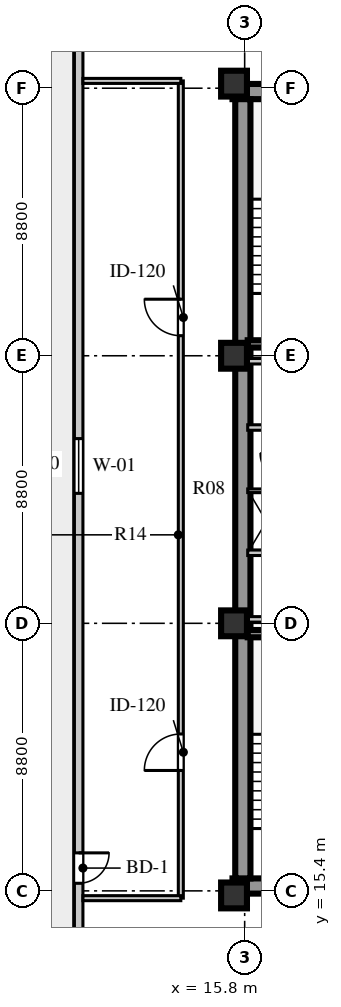
"""IFC4 building model, lengths in metres.
Left out: names, types, materials, properties, quantities, classifications, styles, units other than length and angle.
Written with IfcOpenShell. Run it as: python <this file> out.ifc"""

import sys

from ifc_helpers import new_model, si_unit, direction, frame, frame_2d, origin, origin_2d, place, context, subcontext, project, spatial, rectangle, extrude, element, fill, save


model = new_model("IFC4")
c1 = context("Model", 3, precision=1e-05, world=origin(), true_north=direction((0.0, 1.0)))
c2 = subcontext(c1, "Body", "Model", "MODEL_VIEW")
j1 = project(units=[si_unit("LENGTHUNIT", "METRE"), si_unit("PLANEANGLEUNIT", "RADIAN")], contexts=[c1])
p1 = place(None, origin())
s1 = spatial("IfcSite", under=j1, at=p1, CompositionType="ELEMENT")
p2 = place(p1, origin())
s2 = spatial("IfcBuilding", under=s1, at=p2, CompositionType="ELEMENT")
p3 = place(p2, frame((0.0, 0.0, 142.5)))
s3 = spatial("IfcBuildingStorey", under=s2, at=p3, CompositionType="ELEMENT", Elevation=142.5)
for number, where, z_axis, x_axis in (
    (1, (15.4, 15.56, 0.0), (0.0, 0.0, 1.0), (1.0, 0.0, 0.0)),
    (2, (15.4, 41.69, 0.0), (0.0, 0.0, 1.0), (1.0, 0.0, 0.0)),
):
    element("IfcWall", number, at=place(p3, frame(where, z_axis=z_axis, x_axis=x_axis)), inside=s3, PredefinedType="SHEAR", context=c2, shape_type="SweptSolid", body=[
        extrude(rectangle(XDim=9.68, YDim=0.5, at=frame_2d((4.84, 0.0))), origin(), (0.0, 0.0, 1.0), 3.6),
    ])
p4 = place(p3, frame((15.74, 15.81, 0.0), z_axis=(0.0, 0.0, 1.0), x_axis=(0.0, 1.0, 0.0)))
e3 = element("IfcWall", 3, at=p4, inside=s3, PredefinedType="SHEAR", context=c2, shape_type="SweptSolid", body=[
    extrude(rectangle(XDim=25.63, YDim=0.5, at=frame_2d((12.815, 0.0))), origin(), (0.0, 0.0, 1.0), 3.6),
])
for number, where, z_axis, x_axis in (
    (4, (15.45, 15.25, 0.0), (0.0, 0.0, 1.0), (1.0, 0.0, 0.0)),
    (5, (15.45, 24.2, 0.0), (0.0, 0.0, 1.0), (1.0, 0.0, 0.0)),
    (6, (15.45, 33.0, 0.0), (0.0, 0.0, 1.0), (1.0, 0.0, 0.0)),
    (7, (15.45, 41.95, 0.0), (0.0, 0.0, 1.0), (1.0, 0.0, 0.0)),
):
    element("IfcColumn", number, at=place(p3, frame(where, z_axis=z_axis, x_axis=x_axis)), inside=s3, PredefinedType="COLUMN", context=c2, shape_type="SweptSolid", body=[
        extrude(rectangle(XDim=0.85, YDim=0.85, at=origin_2d()), origin(), (0.0, 0.0, 1.0), 3.6),
    ])
p5 = place(p3, frame((10.34, 43.87, 0.0), z_axis=(0.0, 0.0, 1.0), x_axis=(0.0, -1.0, 0.0)))
e8 = element("IfcWall", 8, at=p5, inside=s3, PredefinedType="STANDARD", context=c2, shape_type="SweptSolid", body=[
    extrude(rectangle(XDim=30.54, YDim=0.28, at=frame_2d((15.27, 0.0))), origin(), (0.0, 0.0, 1.0), 3.6),
])
p6 = place(p5, frame((27.22, 0.0, 0.0)))
e9 = element("IfcOpeningElement", 9, at=p6, cuts=e8, PredefinedType="OPENING", context=c2, shape_type="SweptSolid", body=[
    extrude(rectangle(XDim=1.0, YDim=2.05, at=frame_2d((0.5, 1.025))), frame((0.0, 0.15, 0.0), z_axis=(0.0, -1.0, 0.0), x_axis=(1.0, 0.0, 0.0)), (0.0, 0.0, 1.0), 0.3),
])
p7 = place(p5, frame((13.595, 0.0, 0.8)))
e10 = element("IfcOpeningElement", 10, at=p7, cuts=e8, PredefinedType="OPENING", context=c2, shape_type="SweptSolid", body=[
    extrude(rectangle(XDim=1.8, YDim=2.0, at=frame_2d((0.9, 1.0))), frame((0.0, 0.15, 0.0), z_axis=(0.0, -1.0, 0.0), x_axis=(1.0, 0.0, 0.0)), (0.0, 0.0, 1.0), 0.3),
])
p8 = place(p3, frame((15.9, 23.86, 0.0), z_axis=(0.0, 0.0, 1.0), x_axis=(1.0, 0.0, 0.0)))
e11 = element("IfcWall", 11, at=p8, inside=s3, PredefinedType="SHEAR", context=c2, shape_type="SweptSolid", body=[
    extrude(rectangle(XDim=3.52, YDim=0.24, at=frame_2d((1.76, 0.0))), origin(), (0.0, 0.0, 1.0), 3.85),
])
p9 = place(p3, frame((15.9, 26.52, 0.0), z_axis=(0.0, 0.0, 1.0), x_axis=(1.0, 0.0, 0.0)))
e12 = element("IfcWall", 12, at=p9, inside=s3, PredefinedType="SOLIDWALL", context=c2, shape_type="SweptSolid", body=[
    extrude(rectangle(XDim=8.68, YDim=0.18, at=frame_2d((4.34, 0.0))), origin(), (0.0, 0.0, 1.0), 3.6),
])
p10 = place(p9, frame((2.5, 0.0, 0.0)))
e13 = element("IfcOpeningElement", 13, at=p10, cuts=e12, PredefinedType="OPENING", context=c2, shape_type="SweptSolid", body=[
    extrude(rectangle(XDim=0.95, YDim=2.1, at=frame_2d((0.475, 1.05))), frame((0.0, 0.1, 0.0), z_axis=(0.0, -1.0, 0.0), x_axis=(1.0, 0.0, 0.0)), (0.0, 0.0, 1.0), 0.2),
])
p11 = place(p9, frame((6.0, 0.0, 0.0)))
e14 = element("IfcOpeningElement", 14, at=p11, cuts=e12, PredefinedType="OPENING", context=c2, shape_type="SweptSolid", body=[
    extrude(rectangle(XDim=0.95, YDim=2.1, at=frame_2d((0.475, 1.05))), frame((0.0, 0.1, 0.0), z_axis=(0.0, -1.0, 0.0), x_axis=(1.0, 0.0, 0.0)), (0.0, 0.0, 1.0), 0.2),
])
p12 = place(p3, frame((15.9, 24.33, 0.0), z_axis=(0.0, 0.0, 1.0), x_axis=(1.0, 0.0, 0.0)))
e15 = element("IfcWall", 15, at=p12, inside=s3, PredefinedType="SOLIDWALL", context=c2, shape_type="SweptSolid", body=[
    extrude(rectangle(XDim=8.68, YDim=0.18, at=frame_2d((4.34, 0.0))), origin(), (0.0, 0.0, 1.0), 2.95),
])
p13 = place(p3, frame((15.9, 28.56, 0.0), z_axis=(0.0, 0.0, 1.0), x_axis=(1.0, 0.0, 0.0)))
e16 = element("IfcWall", 16, at=p13, inside=s3, PredefinedType="PARTITIONING", context=c2, shape_type="SweptSolid", body=[
    extrude(rectangle(XDim=1.2, YDim=0.12, at=frame_2d((0.6, 0.0))), origin(), (0.0, 0.0, 1.0), 3.6),
])
p14 = place(p3, frame((15.9, 30.64, 0.0), z_axis=(0.0, 0.0, 1.0), x_axis=(1.0, 0.0, 0.0)))
e17 = element("IfcWall", 17, at=p14, inside=s3, PredefinedType="SOLIDWALL", context=c2, shape_type="SweptSolid", body=[
    extrude(rectangle(XDim=8.68, YDim=0.18, at=frame_2d((4.34, 0.0))), origin(), (0.0, 0.0, 1.0), 3.6),
])
p15 = place(p14, frame((1.76, 0.0, 0.0)))
e18 = element("IfcOpeningElement", 18, at=p15, cuts=e17, PredefinedType="OPENING", context=c2, shape_type="SweptSolid", body=[
    extrude(rectangle(XDim=1.0, YDim=2.1, at=frame_2d((0.5, 1.05))), frame((0.0, 0.1, 0.0), z_axis=(0.0, -1.0, 0.0), x_axis=(1.0, 0.0, 0.0)), (0.0, 0.0, 1.0), 0.2),
])
p16 = place(p14, frame((3.6, 0.0, 0.0)))
e19 = element("IfcOpeningElement", 19, at=p16, cuts=e17, PredefinedType="OPENING", context=c2, shape_type="SweptSolid", body=[
    extrude(rectangle(XDim=1.0, YDim=2.1, at=frame_2d((0.5, 1.05))), frame((0.0, 0.1, 0.0), z_axis=(0.0, -1.0, 0.0), x_axis=(1.0, 0.0, 0.0)), (0.0, 0.0, 1.0), 0.2),
])
p17 = place(p14, frame((5.44, 0.0, 0.0)))
e20 = element("IfcOpeningElement", 20, at=p17, cuts=e17, PredefinedType="OPENING", context=c2, shape_type="SweptSolid", body=[
    extrude(rectangle(XDim=1.0, YDim=2.1, at=frame_2d((0.5, 1.05))), frame((0.0, 0.1, 0.0), z_axis=(0.0, -1.0, 0.0), x_axis=(1.0, 0.0, 0.0)), (0.0, 0.0, 1.0), 0.2),
])
p18 = place(p14, frame((7.28, 0.0, 0.0)))
e21 = element("IfcOpeningElement", 21, at=p18, cuts=e17, PredefinedType="OPENING", context=c2, shape_type="SweptSolid", body=[
    extrude(rectangle(XDim=1.0, YDim=2.1, at=frame_2d((0.5, 1.05))), frame((0.0, 0.1, 0.0), z_axis=(0.0, -1.0, 0.0), x_axis=(1.0, 0.0, 0.0)), (0.0, 0.0, 1.0), 0.2),
])
p19 = place(p3, frame((15.9, 32.82, 0.0), z_axis=(0.0, 0.0, 1.0), x_axis=(1.0, 0.0, 0.0)))
e22 = element("IfcWall", 22, at=p19, inside=s3, PredefinedType="SOLIDWALL", context=c2, shape_type="SweptSolid", body=[
    extrude(rectangle(XDim=8.68, YDim=0.18, at=frame_2d((4.34, 0.0))), origin(), (0.0, 0.0, 1.0), 2.95),
])
p20 = place(p3, frame((15.9, 33.39, 0.0), z_axis=(0.0, 0.0, 1.0), x_axis=(1.0, 0.0, 0.0)))
e23 = element("IfcWall", 23, at=p20, inside=s3, PredefinedType="SHEAR", context=c2, shape_type="SweptSolid", body=[
    extrude(rectangle(XDim=3.52, YDim=0.24, at=frame_2d((1.76, 0.0))), origin(), (0.0, 0.0, 1.0), 3.85),
])
p21 = place(p3, frame((13.7, 15.16, 0.0), z_axis=(0.0, 0.0, 1.0), x_axis=(0.0, 1.0, 0.0)))
e24 = element("IfcWall", 24, at=p21, inside=s3, PredefinedType="PARTITIONING", context=c2, shape_type="SweptSolid", body=[
    extrude(rectangle(XDim=26.88, YDim=0.165, at=frame_2d((13.44, 0.0))), origin(), (0.0, 0.0, 1.0), 3.6),
])
p22 = place(p21, frame((4.2, 0.0, 0.0)))
e25 = element("IfcOpeningElement", 25, at=p22, cuts=e24, PredefinedType="OPENING", context=c2, shape_type="SweptSolid", body=[
    extrude(rectangle(XDim=1.2, YDim=2.1, at=frame_2d((0.6, 1.05))), frame((0.0, 0.093, 0.0), z_axis=(0.0, -1.0, 0.0), x_axis=(1.0, 0.0, 0.0)), (0.0, 0.0, 1.0), 0.185),
])
p23 = place(p21, frame((18.5, 0.0, 0.0)))
e26 = element("IfcOpeningElement", 26, at=p23, cuts=e24, PredefinedType="OPENING", context=c2, shape_type="SweptSolid", body=[
    extrude(rectangle(XDim=1.2, YDim=2.1, at=frame_2d((0.6, 1.05))), frame((0.0, 0.093, 0.0), z_axis=(0.0, -1.0, 0.0), x_axis=(1.0, 0.0, 0.0)), (0.0, 0.0, 1.0), 0.185),
])
for number, where, z_axis, x_axis in (
    (27, (10.48, 15.16, 0.0), (0.0, 0.0, 1.0), (1.0, 0.0, 0.0)),
    (28, (10.48, 42.04, 0.0), (0.0, 0.0, 1.0), (1.0, 0.0, 0.0)),
):
    element("IfcWall", number, at=place(p3, frame(where, z_axis=z_axis, x_axis=x_axis)), inside=s3, PredefinedType="PARTITIONING", context=c2, shape_type="SweptSolid", body=[
        extrude(rectangle(XDim=3.22, YDim=0.165, at=frame_2d((1.61, 0.0))), origin(), (0.0, 0.0, 1.0), 3.1),
    ])
p24 = place(p6, frame((1.0, 0.0, 0.0), z_axis=(0.0, 0.0, 1.0), x_axis=(-1.0, 0.0, 0.0)))
e29 = element("IfcDoor", 29, at=p24, inside=s3, OperationType="SINGLE_SWING_RIGHT", PredefinedType="DOOR", context=c2, shape_type="SweptSolid", body=[
    extrude(rectangle(XDim=1.0, YDim=2.05, at=frame_2d((0.5, 1.025))), frame((0.0, 0.025, 0.0), z_axis=(0.0, -1.0, 0.0), x_axis=(1.0, 0.0, 0.0)), (0.0, 0.0, 1.0), 0.05),
])
fill(e9, e29)
p25 = place(p7, origin())
e30 = element("IfcWindow", 30, at=p25, inside=s3, PartitioningType="SINGLE_PANEL", PredefinedType="WINDOW", context=c2, shape_type="SweptSolid", body=[
    extrude(rectangle(XDim=1.8, YDim=2.0, at=frame_2d((0.9, 1.0))), frame((0.0, 0.03, 0.0), z_axis=(0.0, -1.0, 0.0), x_axis=(1.0, 0.0, 0.0)), (0.0, 0.0, 1.0), 0.06),
])
fill(e10, e30)
p26 = place(p22, origin())
e31 = element("IfcDoor", 31, at=p26, inside=s3, OperationType="SINGLE_SWING_LEFT", PredefinedType="DOOR", context=c2, shape_type="SweptSolid", body=[
    extrude(rectangle(XDim=1.2, YDim=2.1, at=frame_2d((0.6, 1.05))), frame((0.0, 0.025, 0.0), z_axis=(0.0, -1.0, 0.0), x_axis=(1.0, 0.0, 0.0)), (0.0, 0.0, 1.0), 0.05),
])
fill(e25, e31)
p27 = place(p23, origin())
e32 = element("IfcDoor", 32, at=p27, inside=s3, OperationType="SINGLE_SWING_RIGHT", PredefinedType="DOOR", context=c2, shape_type="SweptSolid", body=[
    extrude(rectangle(XDim=1.2, YDim=2.1, at=frame_2d((0.6, 1.05))), frame((0.0, 0.025, 0.0), z_axis=(0.0, -1.0, 0.0), x_axis=(1.0, 0.0, 0.0)), (0.0, 0.0, 1.0), 0.05),
])
fill(e26, e32)
save(model, sys.argv[1])
